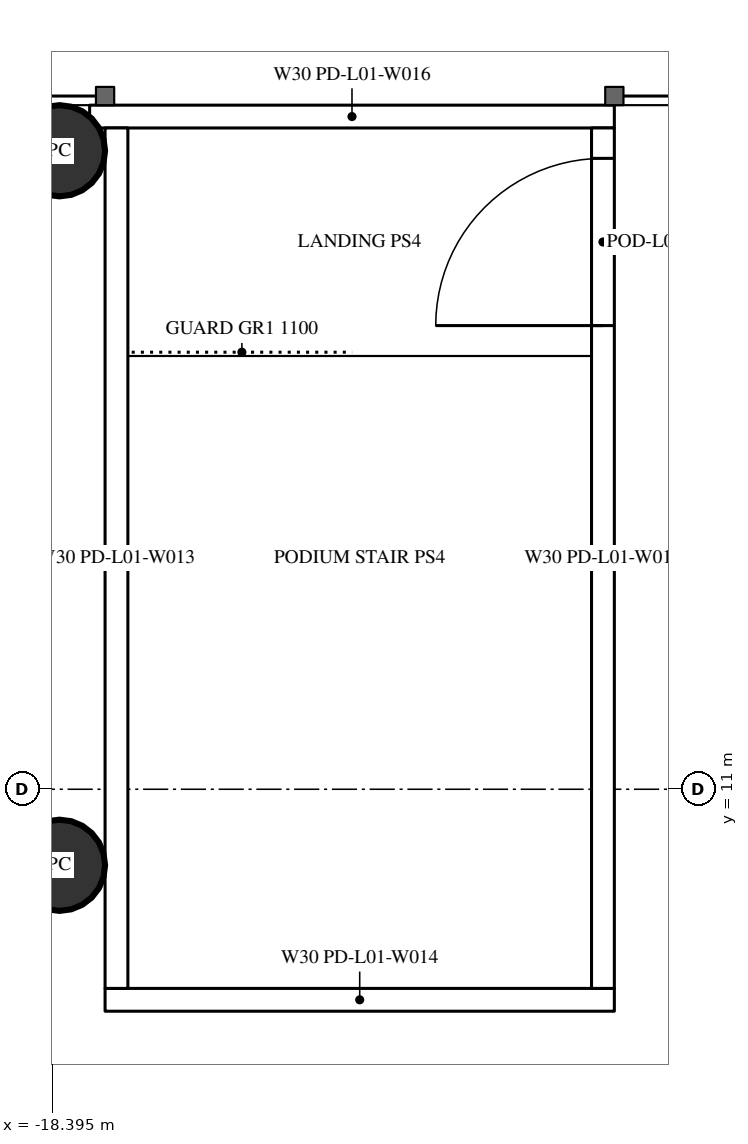
"""IFC4 building model, lengths in metres.
Left out: names, types, materials, properties, quantities, classifications, styles, units other than length and angle.
Written with IfcOpenShell. Run it as: python <this file> out.ifc"""

import sys

from ifc_helpers import new_model, si_unit, direction, frame, frame_2d, origin, origin_2d, place, context, subcontext, project, spatial, rectangle, circle, extrude, element, fill, save


model = new_model("IFC4")
c1 = context("Model", 3, precision=1e-05, world=origin(), true_north=direction((0.0, 1.0)))
c2 = subcontext(c1, "Body", "Model", "MODEL_VIEW")
j1 = project(units=[si_unit("LENGTHUNIT", "METRE"), si_unit("PLANEANGLEUNIT", "RADIAN")], contexts=[c1])
p1 = place(None, origin())
s1 = spatial("IfcSite", under=j1, at=p1, CompositionType="ELEMENT")
p2 = place(p1, origin())
s2 = spatial("IfcBuilding", under=s1, at=p2, CompositionType="ELEMENT")
p3 = place(p2, frame((0.0, 0.0, 7.2)))
s3 = spatial("IfcBuildingStorey", under=s2, at=p3, CompositionType="ELEMENT", Elevation=7.2)
for number, where, z_axis, x_axis in (
    (1, (-18.3, 10.0, 0.0), (0.0, 0.0, 1.0), (1.0, 0.0, 0.0)),
    (2, (-18.3, 19.4, 0.0), (0.0, 0.0, 1.0), (1.0, 0.0, 0.0)),
):
    element("IfcColumn", number, at=place(p3, frame(where, z_axis=z_axis, x_axis=x_axis)), inside=s3, PredefinedType="COLUMN", context=c2, shape_type="SweptSolid", body=[
        extrude(circle(Radius=0.6, at=origin_2d()), origin(), (0.0, 0.0, 1.0), 5.4),
    ])
p4 = place(p3, frame((-17.903, 19.85, 0.0), z_axis=(0.0, 0.0, 1.0), x_axis=(1.0, 0.0, 0.0)))
e3 = element("IfcWall", 3, at=p4, inside=s3, PredefinedType="SOLIDWALL", context=c2, shape_type="SweptSolid", body=[
    extrude(rectangle(XDim=6.903, YDim=0.3, at=frame_2d((3.452, 0.0))), origin(), (0.0, 0.0, 1.0), 5.05),
])
p5 = place(p3, frame((-17.7, 8.23, 0.0), z_axis=(0.0, 0.0, 1.0), x_axis=(1.0, 0.0, 0.0)))
e4 = element("IfcWall", 4, at=p5, inside=s3, PredefinedType="SOLIDWALL", context=c2, shape_type="SweptSolid", body=[
    extrude(rectangle(XDim=6.7, YDim=0.3, at=frame_2d((3.35, 0.0))), origin(), (0.0, 0.0, 1.0), 5.05),
])
p6 = place(p3, frame((-11.15, 8.38, 0.0), z_axis=(0.0, 0.0, 1.0), x_axis=(0.0, 1.0, 0.0)))
e5 = element("IfcWall", 5, at=p6, inside=s3, PredefinedType="SOLIDWALL", context=c2, shape_type="SweptSolid", body=[
    extrude(rectangle(XDim=11.32, YDim=0.3, at=frame_2d((5.66, 0.0))), origin(), (0.0, 0.0, 1.0), 5.05),
])
p7 = place(p6, frame((8.72, 0.0, 0.0)))
e6 = element("IfcOpeningElement", 6, at=p7, cuts=e5, PredefinedType="OPENING", context=c2, shape_type="SweptSolid", body=[
    extrude(rectangle(XDim=2.2, YDim=2.2, at=frame_2d((1.1, 1.1))), frame((0.0, 0.16, 0.0), z_axis=(0.0, -1.0, 0.0), x_axis=(1.0, 0.0, 0.0)), (0.0, 0.0, 1.0), 0.32),
])
p8 = place(p3, frame((-17.55, 8.38, 0.0), z_axis=(0.0, 0.0, 1.0), x_axis=(0.0, 1.0, 0.0)))
e7 = element("IfcWall", 7, at=p8, inside=s3, PredefinedType="SOLIDWALL", context=c2, shape_type="SweptSolid", body=[
    extrude(rectangle(XDim=11.32, YDim=0.3, at=frame_2d((5.66, 0.0))), origin(), (0.0, 0.0, 1.0), 5.05),
])
p9 = place(p7, origin())
e8 = element("IfcDoor", 8, at=p9, inside=s3, OperationType="DOUBLE_DOOR_SINGLE_SWING", PredefinedType="DOOR", context=c2, shape_type="SweptSolid", body=[
    extrude(rectangle(XDim=2.2, YDim=2.2, at=frame_2d((1.1, 1.1))), frame((0.0, 0.025, 0.0), z_axis=(0.0, -1.0, 0.0), x_axis=(1.0, 0.0, 0.0)), (0.0, 0.0, 1.0), 0.05),
])
fill(e6, e8)
save(model, sys.argv[1])
